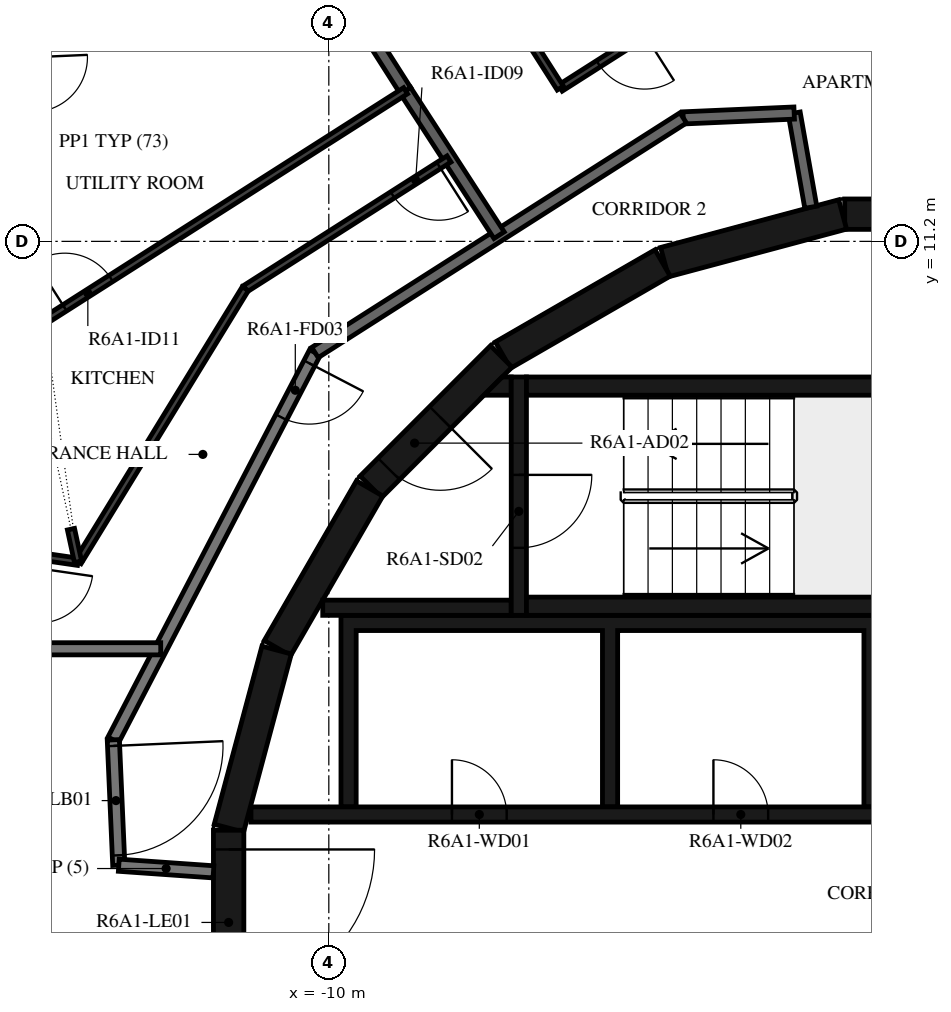
"""IFC4 building model, lengths in metres.
Left out: names, types, materials, properties, quantities, classifications, styles, units other than length and angle.
Written with IfcOpenShell. Run it as: python <this file> out.ifc"""

import sys

from ifc_helpers import new_model, si_unit, direction, frame, frame_2d, origin, place, context, subcontext, project, spatial, polyline, rectangle, outline, extrude, element, fill, save


model = new_model("IFC4")
c1 = context("Model", 3, precision=1e-05, world=origin(), true_north=direction((0.0, 1.0)))
c2 = subcontext(c1, "Body", "Model", "MODEL_VIEW")
j1 = project(units=[si_unit("LENGTHUNIT", "METRE"), si_unit("PLANEANGLEUNIT", "RADIAN")], contexts=[c1])
p1 = place(None, origin())
s1 = spatial("IfcSite", under=j1, at=p1, CompositionType="ELEMENT")
p2 = place(p1, origin())
s2 = spatial("IfcBuilding", under=s1, at=p2, CompositionType="ELEMENT")
p3 = place(p2, frame((0.0, 0.0, 230.2)))
s3 = spatial("IfcBuildingStorey", under=s2, at=p3, CompositionType="ELEMENT", Elevation=230.2)
for number, where, z_axis, x_axis in (
    (1, (1.516, 11.647, 0.0), (0.0, 0.0, 1.0), (-1.0, 0.0, 0.0)),
    (2, (-1.55, 11.643, 0.0), (0.0, 0.0, 1.0), (-0.966, -0.259, 0.0)),
    (3, (-4.51, 10.845, 0.0), (0.0, 0.0, 1.0), (-0.866, -0.5, 0.0)),
):
    element("IfcWall", number, at=place(p3, frame(where, z_axis=z_axis, x_axis=x_axis)), inside=s3, PredefinedType="SHEAR", context=c2, shape_type="SweptSolid", body=[
        extrude(rectangle(XDim=3.033, YDim=0.5, at=frame_2d((1.516, 0.0))), origin(), (0.0, 0.0, 1.0), 3.12),
    ])
p4 = place(p3, frame((-7.164, 9.308, 0.0), z_axis=(0.0, 0.0, 1.0), x_axis=(-0.707106781187, -0.707106781187, 0.0)))
e4 = element("IfcWall", 4, at=p4, inside=s3, PredefinedType="SHEAR", context=c2, shape_type="SweptSolid", body=[
    extrude(rectangle(XDim=3.032, YDim=0.5, at=frame_2d((1.516, 0.0))), origin(), (0.0, 0.0, 1.0), 3.12),
])
p5 = place(p4, frame((1.416, 0.0, 0.0)))
e5 = element("IfcOpeningElement", 5, at=p5, cuts=e4, PredefinedType="OPENING", context=c2, shape_type="SweptSolid", body=[
    extrude(rectangle(XDim=1.2, YDim=2.1, at=frame_2d((0.6, 1.05))), frame((0.0, 0.26, 0.0), z_axis=(0.0, -1.0, 0.0), x_axis=(1.0, 0.0, 0.0)), (0.0, 0.0, 1.0), 0.52),
])
for number, where, z_axis, x_axis in (
    (6, (-9.329, 7.137, 0.0), (0.0, 0.0, 1.0), (-0.5, -0.866, 0.0)),
    (7, (-10.858, 4.479, 0.0), (0.0, 0.0, 1.0), (-0.259, -0.966, 0.0)),
):
    element("IfcWall", number, at=place(p3, frame(where, z_axis=z_axis, x_axis=x_axis)), inside=s3, PredefinedType="SHEAR", context=c2, shape_type="SweptSolid", body=[
        extrude(rectangle(XDim=3.033, YDim=0.5, at=frame_2d((1.516, 0.0))), origin(), (0.0, 0.0, 1.0), 3.12),
    ])
p6 = place(p3, frame((-11.647, 1.516, 0.0), z_axis=(0.0, 0.0, 1.0), x_axis=(0.0, -1.0, 0.0)))
e8 = element("IfcWall", 8, at=p6, inside=s3, PredefinedType="SHEAR", context=c2, shape_type="SweptSolid", body=[
    extrude(rectangle(XDim=3.033, YDim=0.5, at=frame_2d((1.516, 0.0))), origin(), (0.0, 0.0, 1.0), 3.12),
])
p7 = place(p6, frame((0.316, 0.0, 0.0)))
e9 = element("IfcOpeningElement", 9, at=p7, cuts=e8, PredefinedType="OPENING", context=c2, shape_type="SweptSolid", body=[
    extrude(rectangle(XDim=2.4, YDim=2.1, at=frame_2d((1.2, 1.05))), frame((0.0, 0.26, 0.0), z_axis=(0.0, -1.0, 0.0), x_axis=(1.0, 0.0, 0.0)), (0.0, 0.0, 1.0), 0.52),
])
for number, where, z_axis, x_axis in (
    (10, (-6.75, 5.2, 0.0), (0.0, 0.0, 1.0), (1.0, 0.0, 0.0)),
    (11, (-6.75, 8.82, 0.0), (0.0, 0.0, 1.0), (1.0, 0.0, 0.0)),
):
    element("IfcWall", number, at=place(p3, frame(where, z_axis=z_axis, x_axis=x_axis)), inside=s3, PredefinedType="SHEAR", context=c2, shape_type="SweptSolid", body=[
        extrude(rectangle(XDim=6.75, YDim=0.3, at=frame_2d((3.375, 0.0))), origin(), (0.0, 0.0, 1.0), 3.12),
    ])
p8 = place(p3, frame((-6.875, 8.97, 0.0), z_axis=(0.0, 0.0, 1.0), x_axis=(0.0, -1.0, 0.0)))
e12 = element("IfcWall", 12, at=p8, inside=s3, PredefinedType="SHEAR", context=c2, shape_type="SweptSolid", body=[
    extrude(rectangle(XDim=3.92, YDim=0.25, at=frame_2d((1.96, 0.0))), origin(), (0.0, 0.0, 1.0), 3.12),
])
p9 = place(p8, frame((1.61, 0.0, 0.0)))
e13 = element("IfcOpeningElement", 13, at=p9, cuts=e12, PredefinedType="OPENING", context=c2, shape_type="SweptSolid", body=[
    extrude(rectangle(XDim=1.2, YDim=2.1, at=frame_2d((0.6, 1.05))), frame((0.0, 0.135, 0.0), z_axis=(0.0, -1.0, 0.0), x_axis=(1.0, 0.0, 0.0)), (0.0, 0.0, 1.0), 0.27),
])
p10 = place(p3, frame((-7.0, 5.175, 0.0), z_axis=(0.0, 0.0, 1.0), x_axis=(-1.0, 0.0, 0.0)))
e14 = element("IfcWall", 14, at=p10, inside=s3, PredefinedType="SHEAR", context=c2, shape_type="SweptSolid", body=[
    extrude(rectangle(XDim=3.1, YDim=0.25, at=frame_2d((1.55, 0.0))), origin(), (0.0, 0.0, 1.0), 3.12),
])
p11 = place(p3, origin())
e15 = element("IfcWall", 15, at=p11, inside=s3, PredefinedType="SHEAR", context=c2, shape_type="SweptSolid", body=[
    extrude(outline(polyline([(-7.148, 8.97), (-7.0, 8.97), (-7.0, 8.67), (-7.448, 8.67), (-7.148, 8.97)])), origin(), (0.0, 0.0, 1.0), 3.12),
])
p12 = place(p3, origin())
e16 = element("IfcWall", 16, at=p12, inside=s3, PredefinedType="SHEAR", context=c2, shape_type="SweptSolid", body=[
    extrude(outline(polyline([(-9.55, 4.8), (-5.5, 4.8), (-5.5, 1.9), (-5.25, 1.9), (-5.25, 4.8), (-1.2, 4.8), (-1.2, 1.9), (-0.95, 1.9), (-0.95, 4.8), (0.95, 4.8), (0.95, 1.9), (1.2, 1.9), (1.2, 4.8), (3.1, 4.8), (3.1, 1.9), (3.35, 1.9), (3.35, 4.8), (5.25, 4.8), (5.25, 1.9), (5.5, 1.9), (5.5, 4.8), (7.4, 4.8), (7.4, 1.9), (7.65, 1.9), (7.65, 4.8), (9.55, 4.8), (9.55, 1.9), (9.8, 1.9), (9.8, 4.8), (9.8, 5.05), (-9.8, 5.05), (-9.8, 4.8), (-9.8, 1.9), (-9.55, 1.9), (-9.55, 4.8)])), origin(), (0.0, 0.0, 1.0), 3.12),
])
p13 = place(p3, frame((-11.28, 1.775, 0.0), z_axis=(0.0, 0.0, 1.0), x_axis=(1.0, 0.0, 0.0)))
e17 = element("IfcWall", 17, at=p13, inside=s3, PredefinedType="SHEAR", context=c2, shape_type="SweptSolid", body=[
    extrude(rectangle(XDim=14.38, YDim=0.25, at=frame_2d((7.19, 0.0))), origin(), (0.0, 0.0, 1.0), 3.12),
])
p14 = place(p13, frame((10.73, 0.0, 0.0)))
e18 = element("IfcOpeningElement", 18, at=p14, cuts=e17, PredefinedType="OPENING", context=c2, shape_type="SweptSolid", body=[
    extrude(rectangle(XDim=1.1, YDim=2.1, at=frame_2d((0.55, 1.05))), frame((0.0, 0.135, 0.0), z_axis=(0.0, -1.0, 0.0), x_axis=(1.0, 0.0, 0.0)), (0.0, 0.0, 1.0), 0.27),
])
p15 = place(p13, frame((12.88, 0.0, 0.0)))
e19 = element("IfcOpeningElement", 19, at=p15, cuts=e17, PredefinedType="OPENING", context=c2, shape_type="SweptSolid", body=[
    extrude(rectangle(XDim=1.1, YDim=2.1, at=frame_2d((0.55, 1.05))), frame((0.0, 0.135, 0.0), z_axis=(0.0, -1.0, 0.0), x_axis=(1.0, 0.0, 0.0)), (0.0, 0.0, 1.0), 0.27),
])
p16 = place(p13, frame((3.305, 0.0, 0.0)))
e20 = element("IfcOpeningElement", 20, at=p16, cuts=e17, PredefinedType="OPENING", context=c2, shape_type="SweptSolid", body=[
    extrude(rectangle(XDim=0.9, YDim=2.1, at=frame_2d((0.45, 1.05))), frame((0.0, 0.135, 0.0), z_axis=(0.0, -1.0, 0.0), x_axis=(1.0, 0.0, 0.0)), (0.0, 0.0, 1.0), 0.27),
])
p17 = place(p13, frame((7.605, 0.0, 0.0)))
e21 = element("IfcOpeningElement", 21, at=p17, cuts=e17, PredefinedType="OPENING", context=c2, shape_type="SweptSolid", body=[
    extrude(rectangle(XDim=0.9, YDim=2.1, at=frame_2d((0.45, 1.05))), frame((0.0, 0.135, 0.0), z_axis=(0.0, -1.0, 0.0), x_axis=(1.0, 0.0, 0.0)), (0.0, 0.0, 1.0), 0.27),
])
p18 = place(p3, frame((-10.228, 9.372, 0.0), z_axis=(0.0, 0.0, 1.0), x_axis=(-0.461759464021, -0.887005184532, 0.0)))
e22 = element("IfcWall", 22, at=p18, inside=s3, PredefinedType="STANDARD", context=c2, shape_type="SweptSolid", body=[
    extrude(rectangle(XDim=7.181, YDim=0.2, at=frame_2d((3.591, 0.0))), origin(), (0.0, 0.0, 1.0), 3.12),
])
p19 = place(p18, frame((0.2, 0.0, 0.0)))
e23 = element("IfcOpeningElement", 23, at=p19, cuts=e22, PredefinedType="OPENING", context=c2, shape_type="SweptSolid", body=[
    extrude(rectangle(XDim=1.0, YDim=2.1, at=frame_2d((0.5, 1.05))), frame((0.0, 0.11, 0.0), z_axis=(0.0, -1.0, 0.0), x_axis=(1.0, 0.0, 0.0)), (0.0, 0.0, 1.0), 0.22),
])
p20 = place(p3, frame((-13.544, 3.003, 0.0), z_axis=(0.0, 0.0, 1.0), x_axis=(0.043652842459, -0.99904676034, 0.0)))
e24 = element("IfcWall", 24, at=p20, inside=s3, PredefinedType="STANDARD", context=c2, shape_type="SweptSolid", body=[
    extrude(rectangle(XDim=2.064, YDim=0.2, at=frame_2d((1.032, 0.0))), origin(), (0.0, 0.0, 1.0), 3.12),
])
p21 = place(p20, frame((0.1, 0.0, 0.0)))
e25 = element("IfcOpeningElement", 25, at=p21, cuts=e24, PredefinedType="OPENING", context=c2, shape_type="SweptSolid", body=[
    extrude(rectangle(XDim=1.8, YDim=2.1, at=frame_2d((0.9, 1.05))), frame((0.0, 0.11, 0.0), z_axis=(0.0, -1.0, 0.0), x_axis=(1.0, 0.0, 0.0)), (0.0, 0.0, 1.0), 0.22),
])
p22 = place(p3, frame((-13.454, 0.941, 0.0), z_axis=(0.0, 0.0, 1.0), x_axis=(0.99755155062, -0.069934997354, 0.0)))
e26 = element("IfcWall", 26, at=p22, inside=s3, PredefinedType="STANDARD", context=c2, shape_type="SweptSolid", body=[
    extrude(rectangle(XDim=1.561, YDim=0.2, at=frame_2d((0.78, 0.0))), origin(), (0.0, 0.0, 1.0), 3.12),
])
p23 = place(p3, frame((-2.074, 11.761, 0.0), z_axis=(0.0, 0.0, 1.0), x_axis=(-0.173679082312, 0.984802303189, 0.0)))
e27 = element("IfcWall", 27, at=p23, inside=s3, PredefinedType="STANDARD", context=c2, shape_type="SweptSolid", body=[
    extrude(rectangle(XDim=1.573, YDim=0.2, at=frame_2d((0.787, 0.0))), origin(), (0.0, 0.0, 1.0), 3.12),
])
p24 = place(p3, frame((-2.347, 13.31, 0.0), z_axis=(0.0, 0.0, 1.0), x_axis=(-0.999050095671, -0.043576442492, 0.0)))
e28 = element("IfcWall", 28, at=p24, inside=s3, PredefinedType="STANDARD", context=c2, shape_type="SweptSolid", body=[
    extrude(rectangle(XDim=1.826, YDim=0.2, at=frame_2d((0.913, 0.0))), origin(), (0.0, 0.0, 1.0), 3.12),
])
p25 = place(p3, frame((-4.172, 13.231, 0.0), z_axis=(0.0, 0.0, 1.0), x_axis=(-0.843388394728, -0.537304397561, 0.0)))
e29 = element("IfcWall", 29, at=p25, inside=s3, PredefinedType="STANDARD", context=c2, shape_type="SweptSolid", body=[
    extrude(rectangle(XDim=7.181, YDim=0.2, at=frame_2d((3.59, 0.0))), origin(), (0.0, 0.0, 1.0), 3.12),
])
p26 = place(p3, frame((-12.764, 4.5, 0.0), z_axis=(0.0, 0.0, 1.0), x_axis=(-1.0, 0.0, 0.0)))
e30 = element("IfcWall", 30, at=p26, inside=s3, PredefinedType="STANDARD", context=c2, shape_type="SweptSolid", body=[
    extrude(rectangle(XDim=4.086, YDim=0.2, at=frame_2d((2.043, 0.0))), origin(), (0.0, 0.0, 1.0), 3.12),
])
p27 = place(p3, frame((-8.738, 13.677, 0.0), z_axis=(0.0, 0.0, 1.0), x_axis=(0.54358037296, -0.839357121929, 0.0)))
e31 = element("IfcWall", 31, at=p27, inside=s3, PredefinedType="STANDARD", context=c2, shape_type="SweptSolid", body=[
    extrude(rectangle(XDim=2.83, YDim=0.2, at=frame_2d((1.415, 0.0))), origin(), (0.0, 0.0, 1.0), 3.12),
])
p28 = place(p3, frame((-9.663, 15.129, 0.0), z_axis=(0.0, 0.0, 1.0), x_axis=(0.537205715853, -0.843451254581, 0.0)))
e32 = element("IfcWall", 32, at=p28, inside=s3, PredefinedType="STANDARD", context=c2, shape_type="SweptSolid", body=[
    extrude(rectangle(XDim=1.722, YDim=0.2, at=frame_2d((0.861, 0.0))), origin(), (0.0, 0.0, 1.0), 3.12),
])
p29 = place(p3, frame((-4.639, 14.712, 0.0), z_axis=(0.0, 0.0, 1.0), x_axis=(-0.843361471414, -0.537346655833, 0.0)))
e33 = element("IfcWall", 33, at=p29, inside=s3, PredefinedType="PARTITIONING", context=c2, shape_type="SweptSolid", body=[
    extrude(rectangle(XDim=1.844, YDim=0.12, at=frame_2d((0.922, 0.0))), origin(), (0.0, 0.0, 1.0), 3.12),
])
p30 = place(p29, frame((0.2, 0.0, 0.0)))
e34 = element("IfcOpeningElement", 34, at=p30, cuts=e33, PredefinedType="OPENING", context=c2, shape_type="SweptSolid", body=[
    extrude(rectangle(XDim=0.9, YDim=2.1, at=frame_2d((0.45, 1.05))), frame((0.0, 0.07, 0.0), z_axis=(0.0, -1.0, 0.0), x_axis=(1.0, 0.0, 0.0)), (0.0, 0.0, 1.0), 0.14),
])
p31 = place(p3, frame((-6.194, 13.721, 0.0), z_axis=(0.0, 0.0, 1.0), x_axis=(-0.537316807294, 0.843380488629, 0.0)))
e35 = element("IfcWall", 35, at=p31, inside=s3, PredefinedType="PARTITIONING", context=c2, shape_type="SweptSolid", body=[
    extrude(rectangle(XDim=4.331, YDim=0.12, at=frame_2d((2.165, 0.0))), origin(), (0.0, 0.0, 1.0), 3.12),
])
p32 = place(p3, frame((-8.023, 12.555, 0.0), z_axis=(0.0, 0.0, 1.0), x_axis=(-0.843408270233, -0.537273198385, 0.0)))
e36 = element("IfcWall", 36, at=p32, inside=s3, PredefinedType="PARTITIONING", context=c2, shape_type="SweptSolid", body=[
    extrude(rectangle(XDim=3.971, YDim=0.12, at=frame_2d((1.986, 0.0))), origin(), (0.0, 0.0, 1.0), 3.12),
])
p33 = place(p32, frame((0.2, 0.0, 0.0)))
e37 = element("IfcOpeningElement", 37, at=p33, cuts=e36, PredefinedType="OPENING", context=c2, shape_type="SweptSolid", body=[
    extrude(rectangle(XDim=0.9, YDim=2.1, at=frame_2d((0.45, 1.05))), frame((0.0, 0.07, 0.0), z_axis=(0.0, -1.0, 0.0), x_axis=(1.0, 0.0, 0.0)), (0.0, 0.0, 1.0), 0.14),
])
p34 = place(p3, frame((-11.373, 10.421, 0.0), z_axis=(0.0, 0.0, 1.0), x_axis=(-0.522435957358, -0.852678527031, 0.0)))
e38 = element("IfcWall", 38, at=p34, inside=s3, PredefinedType="PARTITIONING", context=c2, shape_type="SweptSolid", body=[
    extrude(rectangle(XDim=5.267, YDim=0.12, at=frame_2d((2.633, 0.0))), origin(), (0.0, 0.0, 1.0), 3.12),
])
p35 = place(p3, frame((-14.125, 5.931, 0.0), z_axis=(0.0, 0.0, 1.0), x_axis=(-0.989621518838, 0.143698467119, 0.0)))
e39 = element("IfcWall", 39, at=p35, inside=s3, PredefinedType="PARTITIONING", context=c2, shape_type="SweptSolid", body=[
    extrude(rectangle(XDim=0.63, YDim=0.12, at=frame_2d((0.315, 0.0))), origin(), (0.0, 0.0, 1.0), 3.12),
])
p36 = place(p3, frame((-14.68, 9.891, 0.0), z_axis=(0.0, 0.0, 1.0), x_axis=(0.843391697183, 0.537299213774, 0.0)))
e40 = element("IfcWall", 40, at=p36, inside=s3, PredefinedType="PARTITIONING", context=c2, shape_type="SweptSolid", body=[
    extrude(rectangle(XDim=7.045, YDim=0.12, at=frame_2d((3.522, 0.0))), origin(), (0.0, 0.0, 1.0), 3.12),
])
p37 = place(p36, frame((0.4, 0.0, 0.0)))
e41 = element("IfcOpeningElement", 41, at=p37, cuts=e40, PredefinedType="OPENING", context=c2, shape_type="SweptSolid", body=[
    extrude(rectangle(XDim=0.9, YDim=2.1, at=frame_2d((0.45, 1.05))), frame((0.0, 0.07, 0.0), z_axis=(0.0, -1.0, 0.0), x_axis=(1.0, 0.0, 0.0)), (0.0, 0.0, 1.0), 0.14),
])
p38 = place(p3, frame((-14.24, 6.467, 0.0), z_axis=(0.0, 0.0, 1.0), x_axis=(0.210896225868, -0.977508456186, 0.0)))
e42 = element("IfcWall", 42, at=p38, inside=s3, PredefinedType="PARTITIONING", context=c2, shape_type="SweptSolid", body=[
    extrude(rectangle(XDim=0.549, YDim=0.12, at=frame_2d((0.274, 0.0))), origin(), (0.0, 0.0, 1.0), 3.12),
])
p39 = place(p9, origin())
e43 = element("IfcDoor", 43, at=p39, inside=s3, OperationType="SINGLE_SWING_LEFT", PredefinedType="DOOR", context=c2, shape_type="SweptSolid", body=[
    extrude(rectangle(XDim=1.2, YDim=2.1, at=frame_2d((0.6, 1.05))), frame((0.0, 0.025, 0.0), z_axis=(0.0, -1.0, 0.0), x_axis=(1.0, 0.0, 0.0)), (0.0, 0.0, 1.0), 0.05),
])
fill(e13, e43)
p40 = place(p5, origin())
e44 = element("IfcDoor", 44, at=p40, inside=s3, OperationType="SINGLE_SWING_RIGHT", PredefinedType="DOOR", context=c2, shape_type="SweptSolid", body=[
    extrude(rectangle(XDim=1.2, YDim=2.1, at=frame_2d((0.6, 1.05))), frame((0.0, 0.025, 0.0), z_axis=(0.0, -1.0, 0.0), x_axis=(1.0, 0.0, 0.0)), (0.0, 0.0, 1.0), 0.05),
])
fill(e5, e44)
p41 = place(p7, origin())
e45 = element("IfcDoor", 45, at=p41, inside=s3, OperationType="DOUBLE_DOOR_SINGLE_SWING", PredefinedType="DOOR", context=c2, shape_type="SweptSolid", body=[
    extrude(rectangle(XDim=2.4, YDim=2.1, at=frame_2d((1.2, 1.05))), frame((0.0, 0.025, 0.0), z_axis=(0.0, -1.0, 0.0), x_axis=(1.0, 0.0, 0.0)), (0.0, 0.0, 1.0), 0.05),
])
fill(e9, e45)
p42 = place(p16, origin())
e46 = element("IfcDoor", 46, at=p42, inside=s3, OperationType="SINGLE_SWING_LEFT", PredefinedType="DOOR", context=c2, shape_type="SweptSolid", body=[
    extrude(rectangle(XDim=0.9, YDim=2.1, at=frame_2d((0.45, 1.05))), frame((0.0, 0.025, 0.0), z_axis=(0.0, -1.0, 0.0), x_axis=(1.0, 0.0, 0.0)), (0.0, 0.0, 1.0), 0.05),
])
fill(e20, e46)
p43 = place(p17, origin())
e47 = element("IfcDoor", 47, at=p43, inside=s3, OperationType="SINGLE_SWING_RIGHT", PredefinedType="DOOR", context=c2, shape_type="SweptSolid", body=[
    extrude(rectangle(XDim=0.9, YDim=2.1, at=frame_2d((0.45, 1.05))), frame((0.0, 0.025, 0.0), z_axis=(0.0, -1.0, 0.0), x_axis=(1.0, 0.0, 0.0)), (0.0, 0.0, 1.0), 0.05),
])
fill(e21, e47)
p44 = place(p30, origin())
e48 = element("IfcDoor", 48, at=p44, inside=s3, OperationType="SINGLE_SWING_RIGHT", PredefinedType="DOOR", context=c2, shape_type="SweptSolid", body=[
    extrude(rectangle(XDim=0.9, YDim=2.1, at=frame_2d((0.45, 1.05))), frame((0.0, 0.025, 0.0), z_axis=(0.0, -1.0, 0.0), x_axis=(1.0, 0.0, 0.0)), (0.0, 0.0, 1.0), 0.05),
])
fill(e34, e48)
p45 = place(p19, origin())
e49 = element("IfcDoor", 49, at=p45, inside=s3, OperationType="SINGLE_SWING_LEFT", PredefinedType="DOOR", context=c2, shape_type="SweptSolid", body=[
    extrude(rectangle(XDim=1.0, YDim=2.1, at=frame_2d((0.5, 1.05))), frame((0.0, 0.025, 0.0), z_axis=(0.0, -1.0, 0.0), x_axis=(1.0, 0.0, 0.0)), (0.0, 0.0, 1.0), 0.05),
])
fill(e23, e49)
p46 = place(p33, origin())
e50 = element("IfcDoor", 50, at=p46, inside=s3, OperationType="SINGLE_SWING_LEFT", PredefinedType="DOOR", context=c2, shape_type="SweptSolid", body=[
    extrude(rectangle(XDim=0.9, YDim=2.1, at=frame_2d((0.45, 1.05))), frame((0.0, 0.025, 0.0), z_axis=(0.0, -1.0, 0.0), x_axis=(1.0, 0.0, 0.0)), (0.0, 0.0, 1.0), 0.05),
])
fill(e37, e50)
p47 = place(p37, origin())
e51 = element("IfcDoor", 51, at=p47, inside=s3, OperationType="SINGLE_SWING_LEFT", PredefinedType="DOOR", context=c2, shape_type="SweptSolid", body=[
    extrude(rectangle(XDim=0.9, YDim=2.1, at=frame_2d((0.45, 1.05))), frame((0.0, 0.025, 0.0), z_axis=(0.0, -1.0, 0.0), x_axis=(1.0, 0.0, 0.0)), (0.0, 0.0, 1.0), 0.05),
])
fill(e41, e51)
p48 = place(p21, origin())
e52 = element("IfcDoor", 52, at=p48, inside=s3, OperationType="DOUBLE_DOOR_SINGLE_SWING", PredefinedType="DOOR", context=c2, shape_type="SweptSolid", body=[
    extrude(rectangle(XDim=1.8, YDim=2.1, at=frame_2d((0.9, 1.05))), frame((0.0, 0.025, 0.0), z_axis=(0.0, -1.0, 0.0), x_axis=(1.0, 0.0, 0.0)), (0.0, 0.0, 1.0), 0.05),
])
fill(e25, e52)
save(model, sys.argv[1])
